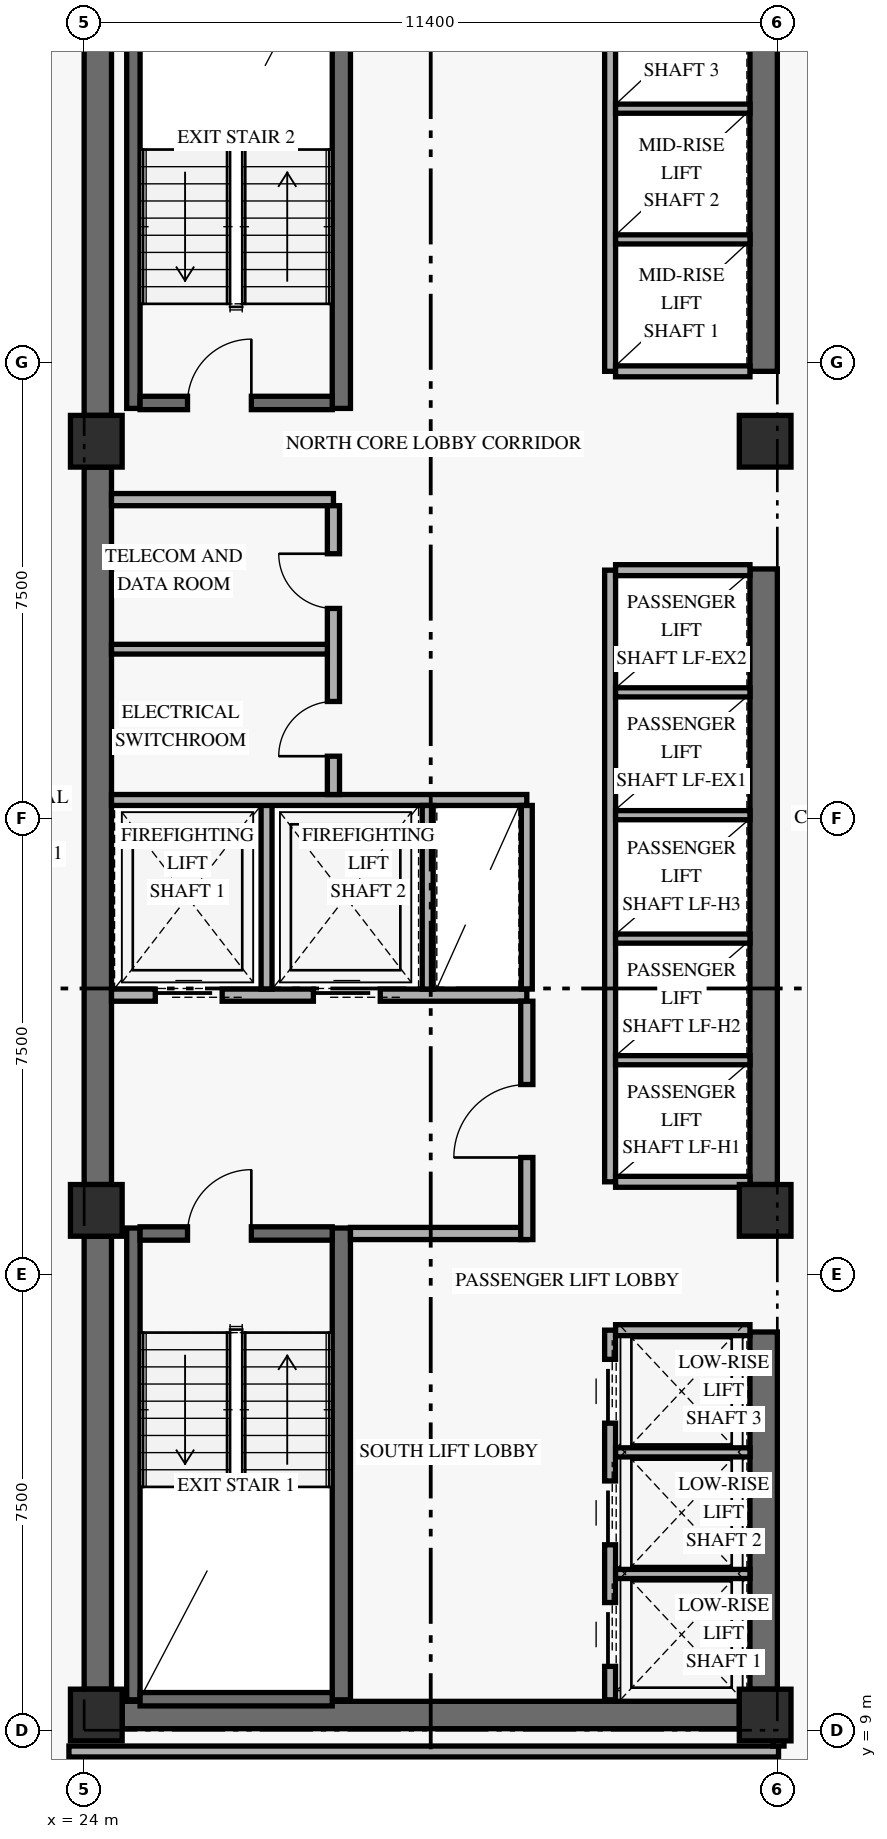
"""IFC4 building model, lengths in metres.
Left out: names, types, materials, properties, quantities, classifications, styles, units other than length and angle.
Written with IfcOpenShell. Run it as: python <this file> out.ifc"""

import sys

from ifc_helpers import new_model, si_unit, direction, frame, frame_2d, origin, origin_2d, place, context, subcontext, project, spatial, rectangle, extrude, element, fill, save


model = new_model("IFC4")
c1 = context("Model", 3, precision=1e-05, world=origin(), true_north=direction((0.0, 1.0)))
c2 = subcontext(c1, "Body", "Model", "MODEL_VIEW")
j1 = project(units=[si_unit("LENGTHUNIT", "METRE"), si_unit("PLANEANGLEUNIT", "RADIAN")], contexts=[c1])
p1 = place(None, origin())
s1 = spatial("IfcSite", under=j1, at=p1, CompositionType="ELEMENT")
p2 = place(p1, origin())
s2 = spatial("IfcBuilding", under=s1, at=p2, CompositionType="ELEMENT")
p3 = place(p2, frame((0.0, 0.0, 38.4)))
s3 = spatial("IfcBuildingStorey", under=s2, at=p3, CompositionType="ELEMENT", Elevation=38.4)
p4 = place(p3, frame((24.225, 9.675, 0.0), z_axis=(0.0, 0.0, 1.0), x_axis=(0.0, 1.0, 0.0)))
e1 = element("IfcWall", 1, at=p4, inside=s3, PredefinedType="SHEAR", context=c2, shape_type="SweptSolid", body=[
    extrude(rectangle(XDim=7.45, YDim=0.45, at=frame_2d((3.725, 0.0))), origin(), (0.0, 0.0, 1.0), 2.667),
])
p5 = place(p3, frame((24.225, 17.975, 0.0), z_axis=(0.0, 0.0, 1.0), x_axis=(0.0, 1.0, 0.0)))
e2 = element("IfcWall", 2, at=p5, inside=s3, PredefinedType="SHEAR", context=c2, shape_type="SweptSolid", body=[
    extrude(rectangle(XDim=11.8, YDim=0.45, at=frame_2d((5.9, 0.0))), origin(), (0.0, 0.0, 1.0), 2.667),
])
p6 = place(p3, frame((24.225, 30.625, 0.0), z_axis=(0.0, 0.0, 1.0), x_axis=(0.0, 1.0, 0.0)))
e3 = element("IfcWall", 3, at=p6, inside=s3, PredefinedType="SHEAR", context=c2, shape_type="SweptSolid", body=[
    extrude(rectangle(XDim=7.7, YDim=0.45, at=frame_2d((3.85, 0.0))), origin(), (0.0, 0.0, 1.0), 2.667),
])
p7 = place(p3, frame((35.175, 9.675, 0.0), z_axis=(0.0, 0.0, 1.0), x_axis=(0.0, 1.0, 0.0)))
e4 = element("IfcWall", 4, at=p7, inside=s3, PredefinedType="SHEAR", context=c2, shape_type="SweptSolid", body=[
    extrude(rectangle(XDim=5.875, YDim=0.45, at=frame_2d((2.938, 0.0))), origin(), (0.0, 0.0, 1.0), 2.667),
])
p8 = place(p3, frame((35.175, 17.975, 0.0), z_axis=(0.0, 0.0, 1.0), x_axis=(0.0, 1.0, 0.0)))
e5 = element("IfcWall", 5, at=p8, inside=s3, PredefinedType="SHEAR", context=c2, shape_type="SweptSolid", body=[
    extrude(rectangle(XDim=10.125, YDim=0.45, at=frame_2d((5.062, 0.0))), origin(), (0.0, 0.0, 1.0), 2.667),
])
p9 = place(p3, frame((35.175, 31.35, 0.0), z_axis=(0.0, 0.0, 1.0), x_axis=(0.0, 1.0, 0.0)))
e6 = element("IfcWall", 6, at=p9, inside=s3, PredefinedType="SHEAR", context=c2, shape_type="SweptSolid", body=[
    extrude(rectangle(XDim=6.975, YDim=0.45, at=frame_2d((3.487, 0.0))), origin(), (0.0, 0.0, 1.0), 2.667),
])
p10 = place(p3, frame((24.625, 9.25, 0.0), z_axis=(0.0, 0.0, 1.0), x_axis=(1.0, 0.0, 0.0)))
e7 = element("IfcWall", 7, at=p10, inside=s3, PredefinedType="SHEAR", context=c2, shape_type="SweptSolid", body=[
    extrude(rectangle(XDim=10.15, YDim=0.45, at=frame_2d((5.075, 0.0))), origin(), (0.0, 0.0, 1.0), 3.36),
])
p11 = place(p3, frame((24.81, 9.5, 0.0), z_axis=(0.0, 0.0, 1.0), x_axis=(0.0, 1.0, 0.0)))
e8 = element("IfcWall", 8, at=p11, inside=s3, PredefinedType="SHEAR", context=c2, shape_type="SweptSolid", body=[
    extrude(rectangle(XDim=7.76, YDim=0.22, at=frame_2d((3.88, 0.0))), origin(), (0.0, 0.0, 1.0), 3.36),
])
p12 = place(p3, frame((28.23, 9.5, 0.0), z_axis=(0.0, 0.0, 1.0), x_axis=(0.0, 1.0, 0.0)))
e9 = element("IfcWall", 9, at=p12, inside=s3, PredefinedType="SHEAR", context=c2, shape_type="SweptSolid", body=[
    extrude(rectangle(XDim=7.76, YDim=0.3, at=frame_2d((3.88, 0.0))), origin(), (0.0, 0.0, 1.0), 3.36),
])
p13 = place(p3, frame((24.92, 9.51, 0.0), z_axis=(0.0, 0.0, 1.0), x_axis=(1.0, 0.0, 0.0)))
e10 = element("IfcWall", 10, at=p13, inside=s3, PredefinedType="SHEAR", context=c2, shape_type="SweptSolid", body=[
    extrude(rectangle(XDim=3.16, YDim=0.22, at=frame_2d((1.58, 0.0))), origin(), (0.0, 0.0, 1.0), 3.36),
])
p14 = place(p3, frame((24.92, 17.17, 0.0), z_axis=(0.0, 0.0, 1.0), x_axis=(1.0, 0.0, 0.0)))
e11 = element("IfcWall", 11, at=p14, inside=s3, PredefinedType="SHEAR", context=c2, shape_type="SweptSolid", body=[
    extrude(rectangle(XDim=3.16, YDim=0.22, at=frame_2d((1.58, 0.0))), origin(), (0.0, 0.0, 1.0), 3.36),
])
p15 = place(p14, frame((0.78, 0.0, 0.0)))
e12 = element("IfcOpeningElement", 12, at=p15, cuts=e11, PredefinedType="OPENING", context=c2, shape_type="SweptSolid", body=[
    extrude(rectangle(XDim=1.05, YDim=2.15, at=frame_2d((0.525, 1.075))), frame((0.0, 0.12, 0.0), z_axis=(0.0, -1.0, 0.0), x_axis=(1.0, 0.0, 0.0)), (0.0, 0.0, 1.0), 0.24),
])
p16 = place(p3, frame((24.81, 30.74, 0.0), z_axis=(0.0, 0.0, 1.0), x_axis=(0.0, 1.0, 0.0)))
e13 = element("IfcWall", 13, at=p16, inside=s3, PredefinedType="SHEAR", context=c2, shape_type="SweptSolid", body=[
    extrude(rectangle(XDim=7.76, YDim=0.22, at=frame_2d((3.88, 0.0))), origin(), (0.0, 0.0, 1.0), 3.36),
])
p17 = place(p3, frame((28.23, 30.74, 0.0), z_axis=(0.0, 0.0, 1.0), x_axis=(0.0, 1.0, 0.0)))
e14 = element("IfcWall", 14, at=p17, inside=s3, PredefinedType="SHEAR", context=c2, shape_type="SweptSolid", body=[
    extrude(rectangle(XDim=7.76, YDim=0.3, at=frame_2d((3.88, 0.0))), origin(), (0.0, 0.0, 1.0), 3.36),
])
p18 = place(p3, frame((24.92, 30.83, 0.0), z_axis=(0.0, 0.0, 1.0), x_axis=(1.0, 0.0, 0.0)))
e15 = element("IfcWall", 15, at=p18, inside=s3, PredefinedType="SHEAR", context=c2, shape_type="SweptSolid", body=[
    extrude(rectangle(XDim=3.16, YDim=0.22, at=frame_2d((1.58, 0.0))), origin(), (0.0, 0.0, 1.0), 3.36),
])
p19 = place(p18, frame((0.78, 0.0, 0.0)))
e16 = element("IfcOpeningElement", 16, at=p19, cuts=e15, PredefinedType="OPENING", context=c2, shape_type="SweptSolid", body=[
    extrude(rectangle(XDim=1.05, YDim=2.15, at=frame_2d((0.525, 1.075))), frame((0.0, 0.12, 0.0), z_axis=(0.0, -1.0, 0.0), x_axis=(1.0, 0.0, 0.0)), (0.0, 0.0, 1.0), 0.24),
])
for number, where, z_axis, x_axis in (
    (17, (24.2, 9.25, 0.0), (0.0, 0.0, 1.0), (1.0, 0.0, 0.0)),
    (18, (24.2, 17.55, 0.0), (0.0, 0.0, 1.0), (1.0, 0.0, 0.0)),
    (19, (24.2, 30.2, 0.0), (0.0, 0.0, 1.0), (1.0, 0.0, 0.0)),
    (20, (35.2, 9.25, 0.0), (0.0, 0.0, 1.0), (1.0, 0.0, 0.0)),
    (21, (35.2, 17.55, 0.0), (0.0, 0.0, 1.0), (1.0, 0.0, 0.0)),
    (22, (35.2, 30.2, 0.0), (0.0, 0.0, 1.0), (1.0, 0.0, 0.0)),
):
    element("IfcColumn", number, at=place(p3, frame(where, z_axis=z_axis, x_axis=x_axis)), inside=s3, PredefinedType="COLUMN", context=c2, shape_type="SweptSolid", body=[
        extrude(rectangle(XDim=0.85, YDim=0.85, at=origin_2d()), origin(), (0.0, 0.0, 1.0), 3.6),
    ])
p20 = place(p3, frame((24.45, 21.09, 0.0), z_axis=(0.0, 0.0, 1.0), x_axis=(1.0, 0.0, 0.0)))
e23 = element("IfcWall", 23, at=p20, inside=s3, PredefinedType="STANDARD", context=c2, shape_type="SweptSolid", body=[
    extrude(rectangle(XDim=6.83, YDim=0.2, at=frame_2d((3.415, 0.0))), origin(), (0.0, 0.0, 1.0), 3.36),
])
p21 = place(p20, frame((0.72, 0.0, 0.0)))
e24 = element("IfcOpeningElement", 24, at=p21, cuts=e23, PredefinedType="OPENING", context=c2, shape_type="SweptSolid", body=[
    extrude(rectangle(XDim=1.1, YDim=2.2, at=frame_2d((0.55, 1.1))), frame((0.0, 0.11, 0.0), z_axis=(0.0, -1.0, 0.0), x_axis=(1.0, 0.0, 0.0)), (0.0, 0.0, 1.0), 0.22),
])
p22 = place(p20, frame((3.32, 0.0, 0.0)))
e25 = element("IfcOpeningElement", 25, at=p22, cuts=e23, PredefinedType="OPENING", context=c2, shape_type="SweptSolid", body=[
    extrude(rectangle(XDim=1.1, YDim=2.2, at=frame_2d((0.55, 1.1))), frame((0.0, 0.11, 0.0), z_axis=(0.0, -1.0, 0.0), x_axis=(1.0, 0.0, 0.0)), (0.0, 0.0, 1.0), 0.22),
])
p23 = place(p3, frame((28.38, 17.17, 0.0), z_axis=(0.0, 0.0, 1.0), x_axis=(1.0, 0.0, 0.0)))
e26 = element("IfcWall", 26, at=p23, inside=s3, PredefinedType="STANDARD", context=c2, shape_type="SweptSolid", body=[
    extrude(rectangle(XDim=2.9, YDim=0.2, at=frame_2d((1.45, 0.0))), origin(), (0.0, 0.0, 1.0), 3.36),
])
p24 = place(p3, frame((31.28, 17.07, 0.0), z_axis=(0.0, 0.0, 1.0), x_axis=(0.0, 1.0, 0.0)))
e27 = element("IfcWall", 27, at=p24, inside=s3, PredefinedType="STANDARD", context=c2, shape_type="SweptSolid", body=[
    extrude(rectangle(XDim=3.92, YDim=0.2, at=frame_2d((1.96, 0.0))), origin(), (0.0, 0.0, 1.0), 2.649),
])
p25 = place(p24, frame((1.35, 0.0, 0.0)))
e28 = element("IfcOpeningElement", 28, at=p25, cuts=e27, PredefinedType="OPENING", context=c2, shape_type="SweptSolid", body=[
    extrude(rectangle(XDim=1.2, YDim=2.15, at=frame_2d((0.6, 1.075))), frame((0.0, 0.11, 0.0), z_axis=(0.0, -1.0, 0.0), x_axis=(1.0, 0.0, 0.0)), (0.0, 0.0, 1.0), 0.22),
])
p26 = place(p3, frame((27.0, 21.19, 0.0), z_axis=(0.0, 0.0, 1.0), x_axis=(0.0, 1.0, 0.0)))
e29 = element("IfcWall", 29, at=p26, inside=s3, PredefinedType="STANDARD", context=c2, shape_type="SweptSolid", body=[
    extrude(rectangle(XDim=3.11, YDim=0.18, at=frame_2d((1.555, 0.0))), origin(), (0.0, 0.0, 1.0), 3.36),
])
p27 = place(p3, frame((24.45, 24.3, 0.0), z_axis=(0.0, 0.0, 1.0), x_axis=(1.0, 0.0, 0.0)))
e30 = element("IfcWall", 30, at=p27, inside=s3, PredefinedType="STANDARD", context=c2, shape_type="SweptSolid", body=[
    extrude(rectangle(XDim=6.83, YDim=0.18, at=frame_2d((3.415, 0.0))), origin(), (0.0, 0.0, 1.0), 3.36),
])
for number, where, z_axis, x_axis in (
    (31, (29.65, 21.19, 0.0), (0.0, 0.0, 1.0), (0.0, 1.0, 0.0)),
    (32, (31.28, 21.19, 0.0), (0.0, 0.0, 1.0), (0.0, 1.0, 0.0)),
):
    element("IfcWall", number, at=place(p3, frame(where, z_axis=z_axis, x_axis=x_axis)), inside=s3, PredefinedType="STANDARD", context=c2, shape_type="SweptSolid", body=[
        extrude(rectangle(XDim=3.02, YDim=0.18, at=frame_2d((1.51, 0.0))), origin(), (0.0, 0.0, 1.0), 3.36),
    ])
p28 = place(p3, frame((24.45, 29.24, 0.0), z_axis=(0.0, 0.0, 1.0), x_axis=(1.0, 0.0, 0.0)))
e33 = element("IfcWall", 33, at=p28, inside=s3, PredefinedType="STANDARD", context=c2, shape_type="SweptSolid", body=[
    extrude(rectangle(XDim=3.65, YDim=0.2, at=frame_2d((1.825, 0.0))), origin(), (0.0, 0.0, 1.0), 3.36),
])
p29 = place(p3, frame((28.1, 24.39, 0.0), z_axis=(0.0, 0.0, 1.0), x_axis=(0.0, 1.0, 0.0)))
e34 = element("IfcWall", 34, at=p29, inside=s3, PredefinedType="STANDARD", context=c2, shape_type="SweptSolid", body=[
    extrude(rectangle(XDim=4.75, YDim=0.2, at=frame_2d((2.375, 0.0))), origin(), (0.0, 0.0, 1.0), 3.36),
])
p30 = place(p29, frame((0.63, 0.0, 0.0)))
e35 = element("IfcOpeningElement", 35, at=p30, cuts=e34, PredefinedType="OPENING", context=c2, shape_type="SweptSolid", body=[
    extrude(rectangle(XDim=0.9, YDim=2.1, at=frame_2d((0.45, 1.05))), frame((0.0, 0.11, 0.0), z_axis=(0.0, -1.0, 0.0), x_axis=(1.0, 0.0, 0.0)), (0.0, 0.0, 1.0), 0.22),
])
p31 = place(p29, frame((3.06, 0.0, 0.0)))
e36 = element("IfcOpeningElement", 36, at=p31, cuts=e34, PredefinedType="OPENING", context=c2, shape_type="SweptSolid", body=[
    extrude(rectangle(XDim=0.9, YDim=2.1, at=frame_2d((0.45, 1.05))), frame((0.0, 0.11, 0.0), z_axis=(0.0, -1.0, 0.0), x_axis=(1.0, 0.0, 0.0)), (0.0, 0.0, 1.0), 0.22),
])
p32 = place(p3, frame((24.45, 26.78, 0.0), z_axis=(0.0, 0.0, 1.0), x_axis=(1.0, 0.0, 0.0)))
e37 = element("IfcWall", 37, at=p32, inside=s3, PredefinedType="PARTITIONING", context=c2, shape_type="SweptSolid", body=[
    extrude(rectangle(XDim=3.55, YDim=0.16, at=frame_2d((1.775, 0.0))), origin(), (0.0, 0.0, 1.0), 3.36),
])
p33 = place(p3, frame((32.65, 9.5, 0.0), z_axis=(0.0, 0.0, 1.0), x_axis=(0.0, 1.0, 0.0)))
e38 = element("IfcWall", 38, at=p33, inside=s3, PredefinedType="STANDARD", context=c2, shape_type="SweptSolid", body=[
    extrude(rectangle(XDim=6.08, YDim=0.18, at=frame_2d((3.04, 0.0))), origin(), (0.0, 0.0, 1.0), 3.36),
])
p34 = place(p33, frame((0.55, 0.0, 0.0)))
e39 = element("IfcOpeningElement", 39, at=p34, cuts=e38, PredefinedType="OPENING", context=c2, shape_type="SweptSolid", body=[
    extrude(rectangle(XDim=1.05, YDim=2.2, at=frame_2d((0.525, 1.1))), frame((0.0, 0.1, 0.0), z_axis=(0.0, -1.0, 0.0), x_axis=(1.0, 0.0, 0.0)), (0.0, 0.0, 1.0), 0.2),
])
p35 = place(p33, frame((2.55, 0.0, 0.0)))
e40 = element("IfcOpeningElement", 40, at=p35, cuts=e38, PredefinedType="OPENING", context=c2, shape_type="SweptSolid", body=[
    extrude(rectangle(XDim=1.05, YDim=2.2, at=frame_2d((0.525, 1.1))), frame((0.0, 0.1, 0.0), z_axis=(0.0, -1.0, 0.0), x_axis=(1.0, 0.0, 0.0)), (0.0, 0.0, 1.0), 0.2),
])
p36 = place(p33, frame((4.55, 0.0, 0.0)))
e41 = element("IfcOpeningElement", 41, at=p36, cuts=e38, PredefinedType="OPENING", context=c2, shape_type="SweptSolid", body=[
    extrude(rectangle(XDim=1.05, YDim=2.2, at=frame_2d((0.525, 1.1))), frame((0.0, 0.1, 0.0), z_axis=(0.0, -1.0, 0.0), x_axis=(1.0, 0.0, 0.0)), (0.0, 0.0, 1.0), 0.2),
])
p37 = place(p3, frame((32.74, 15.58, 0.0), z_axis=(0.0, 0.0, 1.0), x_axis=(1.0, 0.0, 0.0)))
e42 = element("IfcWall", 42, at=p37, inside=s3, PredefinedType="STANDARD", context=c2, shape_type="SweptSolid", body=[
    extrude(rectangle(XDim=2.21, YDim=0.18, at=frame_2d((1.105, 0.0))), origin(), (0.0, 0.0, 1.0), 3.36),
])
for number, where, z_axis, x_axis in (
    (43, (32.74, 11.57, 0.0), (0.0, 0.0, 1.0), (1.0, 0.0, 0.0)),
    (44, (32.74, 13.57, 0.0), (0.0, 0.0, 1.0), (1.0, 0.0, 0.0)),
):
    element("IfcWall", number, at=place(p3, frame(where, z_axis=z_axis, x_axis=x_axis)), inside=s3, PredefinedType="STANDARD", context=c2, shape_type="SweptSolid", body=[
        extrude(rectangle(XDim=2.21, YDim=0.15, at=frame_2d((1.105, 0.0))), origin(), (0.0, 0.0, 1.0), 3.36),
    ])
p38 = place(p3, frame((32.65, 18.02, 0.0), z_axis=(0.0, 0.0, 1.0), x_axis=(0.0, 1.0, 0.0)))
e45 = element("IfcWall", 45, at=p38, inside=s3, PredefinedType="STANDARD", context=c2, shape_type="SweptSolid", body=[
    extrude(rectangle(XDim=10.06, YDim=0.18, at=frame_2d((5.03, 0.0))), origin(), (0.0, 0.0, 1.0), 3.36),
])
for number, where, z_axis, x_axis in (
    (46, (32.74, 18.02, 0.0), (0.0, 0.0, 1.0), (1.0, 0.0, 0.0)),
    (47, (32.74, 28.08, 0.0), (0.0, 0.0, 1.0), (1.0, 0.0, 0.0)),
):
    element("IfcWall", number, at=place(p3, frame(where, z_axis=z_axis, x_axis=x_axis)), inside=s3, PredefinedType="STANDARD", context=c2, shape_type="SweptSolid", body=[
        extrude(rectangle(XDim=2.21, YDim=0.18, at=frame_2d((1.105, 0.0))), origin(), (0.0, 0.0, 1.0), 3.36),
    ])
for number, where, z_axis, x_axis in (
    (48, (32.74, 20.02, 0.0), (0.0, 0.0, 1.0), (1.0, 0.0, 0.0)),
    (49, (32.74, 22.02, 0.0), (0.0, 0.0, 1.0), (1.0, 0.0, 0.0)),
    (50, (32.74, 24.05, 0.0), (0.0, 0.0, 1.0), (1.0, 0.0, 0.0)),
    (51, (32.74, 26.07, 0.0), (0.0, 0.0, 1.0), (1.0, 0.0, 0.0)),
):
    element("IfcWall", number, at=place(p3, frame(where, z_axis=z_axis, x_axis=x_axis)), inside=s3, PredefinedType="STANDARD", context=c2, shape_type="SweptSolid", body=[
        extrude(rectangle(XDim=2.21, YDim=0.15, at=frame_2d((1.105, 0.0))), origin(), (0.0, 0.0, 1.0), 3.36),
    ])
p39 = place(p3, frame((32.65, 31.35, 0.0), z_axis=(0.0, 0.0, 1.0), x_axis=(0.0, 1.0, 0.0)))
e52 = element("IfcWall", 52, at=p39, inside=s3, PredefinedType="STANDARD", context=c2, shape_type="SweptSolid", body=[
    extrude(rectangle(XDim=7.175, YDim=0.18, at=frame_2d((3.587, 0.0))), origin(), (0.0, 0.0, 1.0), 3.36),
])
p40 = place(p3, frame((32.74, 31.35, 0.0), z_axis=(0.0, 0.0, 1.0), x_axis=(1.0, 0.0, 0.0)))
e53 = element("IfcWall", 53, at=p40, inside=s3, PredefinedType="STANDARD", context=c2, shape_type="SweptSolid", body=[
    extrude(rectangle(XDim=2.21, YDim=0.18, at=frame_2d((1.105, 0.0))), origin(), (0.0, 0.0, 1.0), 3.36),
])
for number, where, z_axis, x_axis in (
    (54, (32.74, 33.52, 0.0), (0.0, 0.0, 1.0), (1.0, 0.0, 0.0)),
    (55, (32.74, 35.67, 0.0), (0.0, 0.0, 1.0), (1.0, 0.0, 0.0)),
):
    element("IfcWall", number, at=place(p3, frame(where, z_axis=z_axis, x_axis=x_axis)), inside=s3, PredefinedType="STANDARD", context=c2, shape_type="SweptSolid", body=[
        extrude(rectangle(XDim=2.21, YDim=0.15, at=frame_2d((1.105, 0.0))), origin(), (0.0, 0.0, 1.0), 3.36),
    ])
p41 = place(p3, frame((23.75, 8.65, 0.0), z_axis=(0.0, 0.0, 1.0), x_axis=(1.0, 0.0, 0.0)))
e56 = element("IfcWall", 56, at=p41, inside=s3, PredefinedType="STANDARD", context=c2, shape_type="SweptSolid", body=[
    extrude(rectangle(XDim=11.67, YDim=0.18, at=frame_2d((5.835, 0.0))), origin(), (0.0, 0.0, 1.0), 2.649),
])
p42 = place(p3, frame((35.42, 8.74, 0.0), z_axis=(0.0, 0.0, 1.0), x_axis=(0.0, 1.0, 0.0)))
e57 = element("IfcWall", 57, at=p42, inside=s3, PredefinedType="STANDARD", context=c2, shape_type="SweptSolid", body=[
    extrude(rectangle(XDim=0.51, YDim=0.18, at=frame_2d((0.255, 0.0))), origin(), (0.0, 0.0, 1.0), 3.36),
])
p43 = place(p15, frame((1.05, 0.0, 0.0), z_axis=(0.0, 0.0, 1.0), x_axis=(-1.0, 0.0, 0.0)))
e58 = element("IfcDoor", 58, at=p43, inside=s3, OperationType="SINGLE_SWING_LEFT", PredefinedType="DOOR", context=c2, shape_type="SweptSolid", body=[
    extrude(rectangle(XDim=1.05, YDim=2.15, at=frame_2d((0.525, 1.075))), frame((0.0, 0.025, 0.0), z_axis=(0.0, -1.0, 0.0), x_axis=(1.0, 0.0, 0.0)), (0.0, 0.0, 1.0), 0.05),
])
fill(e12, e58)
p44 = place(p19, origin())
e59 = element("IfcDoor", 59, at=p44, inside=s3, OperationType="SINGLE_SWING_RIGHT", PredefinedType="DOOR", context=c2, shape_type="SweptSolid", body=[
    extrude(rectangle(XDim=1.05, YDim=2.15, at=frame_2d((0.525, 1.075))), frame((0.0, 0.025, 0.0), z_axis=(0.0, -1.0, 0.0), x_axis=(1.0, 0.0, 0.0)), (0.0, 0.0, 1.0), 0.05),
])
fill(e16, e59)
p45 = place(p21, origin())
e60 = element("IfcDoor", 60, at=p45, inside=s3, OperationType="SLIDING_TO_LEFT", PredefinedType="DOOR", context=c2, shape_type="SweptSolid", body=[
    extrude(rectangle(XDim=1.1, YDim=2.2, at=frame_2d((0.55, 1.1))), frame((0.0, 0.025, 0.0), z_axis=(0.0, -1.0, 0.0), x_axis=(1.0, 0.0, 0.0)), (0.0, 0.0, 1.0), 0.05),
])
fill(e24, e60)
p46 = place(p22, origin())
e61 = element("IfcDoor", 61, at=p46, inside=s3, OperationType="SLIDING_TO_LEFT", PredefinedType="DOOR", context=c2, shape_type="SweptSolid", body=[
    extrude(rectangle(XDim=1.1, YDim=2.2, at=frame_2d((0.55, 1.1))), frame((0.0, 0.025, 0.0), z_axis=(0.0, -1.0, 0.0), x_axis=(1.0, 0.0, 0.0)), (0.0, 0.0, 1.0), 0.05),
])
fill(e25, e61)
p47 = place(p25, origin())
e62 = element("IfcDoor", 62, at=p47, inside=s3, OperationType="SINGLE_SWING_LEFT", PredefinedType="DOOR", context=c2, shape_type="SweptSolid", body=[
    extrude(rectangle(XDim=1.2, YDim=2.15, at=frame_2d((0.6, 1.075))), frame((0.0, 0.025, 0.0), z_axis=(0.0, -1.0, 0.0), x_axis=(1.0, 0.0, 0.0)), (0.0, 0.0, 1.0), 0.05),
])
fill(e28, e62)
p48 = place(p30, origin())
e63 = element("IfcDoor", 63, at=p48, inside=s3, OperationType="SINGLE_SWING_LEFT", PredefinedType="DOOR", context=c2, shape_type="SweptSolid", body=[
    extrude(rectangle(XDim=0.9, YDim=2.1, at=frame_2d((0.45, 1.05))), frame((0.0, 0.025, 0.0), z_axis=(0.0, -1.0, 0.0), x_axis=(1.0, 0.0, 0.0)), (0.0, 0.0, 1.0), 0.05),
])
fill(e35, e63)
p49 = place(p31, origin())
e64 = element("IfcDoor", 64, at=p49, inside=s3, OperationType="SINGLE_SWING_RIGHT", PredefinedType="DOOR", context=c2, shape_type="SweptSolid", body=[
    extrude(rectangle(XDim=0.9, YDim=2.1, at=frame_2d((0.45, 1.05))), frame((0.0, 0.025, 0.0), z_axis=(0.0, -1.0, 0.0), x_axis=(1.0, 0.0, 0.0)), (0.0, 0.0, 1.0), 0.05),
])
fill(e36, e64)
p50 = place(p34, origin())
e65 = element("IfcDoor", 65, at=p50, inside=s3, OperationType="SLIDING_TO_LEFT", PredefinedType="DOOR", context=c2, shape_type="SweptSolid", body=[
    extrude(rectangle(XDim=1.05, YDim=2.2, at=frame_2d((0.525, 1.1))), frame((0.0, 0.025, 0.0), z_axis=(0.0, -1.0, 0.0), x_axis=(1.0, 0.0, 0.0)), (0.0, 0.0, 1.0), 0.05),
])
fill(e39, e65)
p51 = place(p35, origin())
e66 = element("IfcDoor", 66, at=p51, inside=s3, OperationType="SLIDING_TO_LEFT", PredefinedType="DOOR", context=c2, shape_type="SweptSolid", body=[
    extrude(rectangle(XDim=1.05, YDim=2.2, at=frame_2d((0.525, 1.1))), frame((0.0, 0.025, 0.0), z_axis=(0.0, -1.0, 0.0), x_axis=(1.0, 0.0, 0.0)), (0.0, 0.0, 1.0), 0.05),
])
fill(e40, e66)
p52 = place(p36, origin())
e67 = element("IfcDoor", 67, at=p52, inside=s3, OperationType="SLIDING_TO_LEFT", PredefinedType="DOOR", context=c2, shape_type="SweptSolid", body=[
    extrude(rectangle(XDim=1.05, YDim=2.2, at=frame_2d((0.525, 1.1))), frame((0.0, 0.025, 0.0), z_axis=(0.0, -1.0, 0.0), x_axis=(1.0, 0.0, 0.0)), (0.0, 0.0, 1.0), 0.05),
])
fill(e41, e67)
save(model, sys.argv[1])
